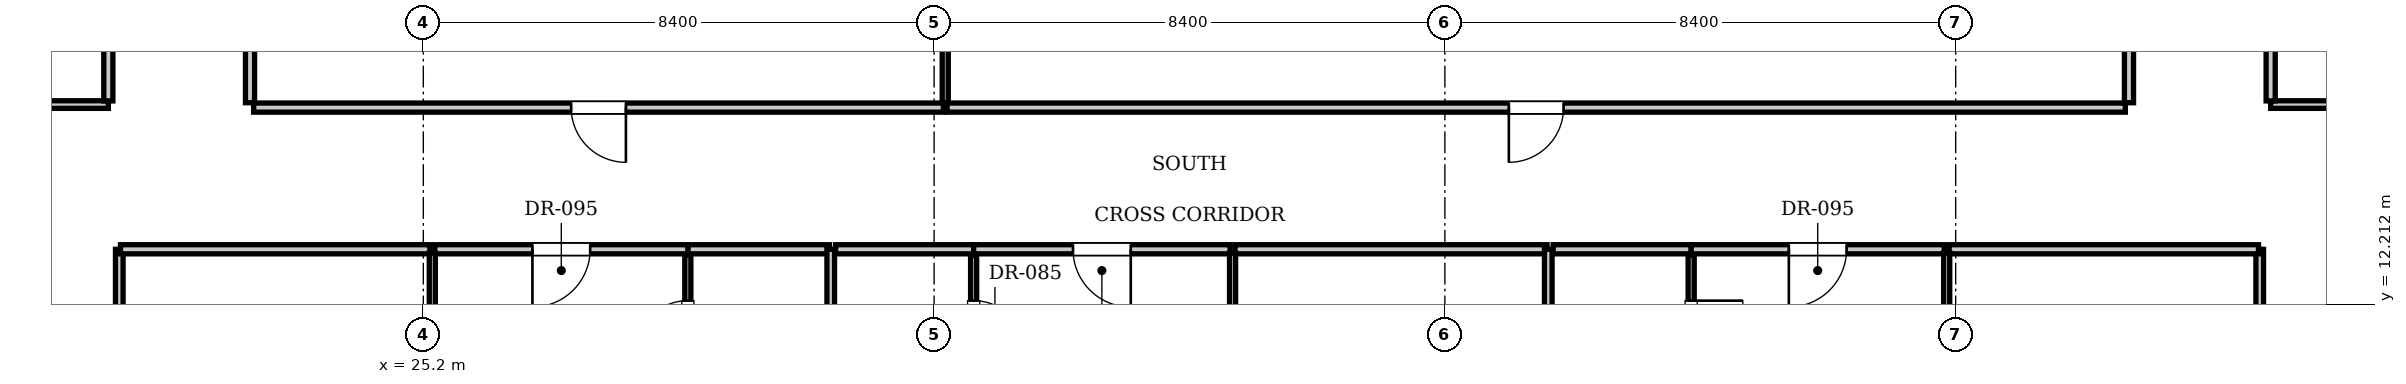
"""IFC4 building model, lengths in metres.
Left out: names, types, materials, properties, quantities, classifications, styles, units other than length and angle.
Written with IfcOpenShell. Run it as: python <this file> out.ifc"""

import sys

from ifc_helpers import new_model, si_unit, direction, frame, frame_2d, origin, place, context, subcontext, project, spatial, rectangle, extrude, element, fill, save


model = new_model("IFC4")
c1 = context("Model", 3, precision=1e-05, world=origin(), true_north=direction((0.0, 1.0)))
c2 = subcontext(c1, "Body", "Model", "MODEL_VIEW")
j1 = project(units=[si_unit("LENGTHUNIT", "METRE"), si_unit("PLANEANGLEUNIT", "RADIAN")], contexts=[c1])
p1 = place(None, origin())
s1 = spatial("IfcSite", under=j1, at=p1, CompositionType="ELEMENT")
p2 = place(p1, origin())
s2 = spatial("IfcBuilding", under=s1, at=p2, CompositionType="ELEMENT")
p3 = place(p2, frame((0.0, 0.0, 69.3)))
s3 = spatial("IfcBuildingStorey", under=s2, at=p3, CompositionType="ELEMENT", Elevation=69.3)
for number, where, z_axis, x_axis in (
    (1, (22.35, 15.53, 0.0), (0.0, 0.0, 1.0), (0.0, 1.0, 0.0)),
    (2, (53.25, 15.53, 0.0), (0.0, 0.0, 1.0), (0.0, 1.0, 0.0)),
):
    element("IfcWall", number, at=place(p3, frame(where, z_axis=z_axis, x_axis=x_axis)), inside=s3, PredefinedType="PARTITIONING", context=c2, shape_type="SweptSolid", body=[
        extrude(rectangle(XDim=8.34, YDim=0.15, at=frame_2d((4.17, 0.0))), origin(), (0.0, 0.0, 1.0), 3.61),
    ])
p4 = place(p3, frame((22.41, 15.45, 0.0), z_axis=(0.0, 0.0, 1.0), x_axis=(1.0, 0.0, 0.0)))
e3 = element("IfcWall", 3, at=p4, inside=s3, PredefinedType="PARTITIONING", context=c2, shape_type="SweptSolid", body=[
    extrude(rectangle(XDim=11.343, YDim=0.15, at=frame_2d((5.671, 0.0))), origin(), (0.0, 0.0, 1.0), 3.61),
])
p5 = place(p4, frame((5.221, 0.0, 0.0)))
e4 = element("IfcOpeningElement", 4, at=p5, cuts=e3, PredefinedType="OPENING", context=c2, shape_type="SweptSolid", body=[
    extrude(rectangle(XDim=0.9, YDim=2.1, at=frame_2d((0.45, 1.05))), frame((0.0, 0.085, 0.0), z_axis=(0.0, -1.0, 0.0), x_axis=(1.0, 0.0, 0.0)), (0.0, 0.0, 1.0), 0.17),
])
p6 = place(p3, frame((33.783, 15.53, 0.0), z_axis=(0.0, 0.0, 1.0), x_axis=(0.0, 1.0, 0.0)))
e5 = element("IfcWall", 5, at=p6, inside=s3, PredefinedType="PARTITIONING", context=c2, shape_type="SweptSolid", body=[
    extrude(rectangle(XDim=8.34, YDim=0.1, at=frame_2d((4.17, 0.0))), origin(), (0.0, 0.0, 1.0), 2.988),
])
p7 = place(p3, frame((33.813, 15.45, 0.0), z_axis=(0.0, 0.0, 1.0), x_axis=(1.0, 0.0, 0.0)))
e6 = element("IfcWall", 6, at=p7, inside=s3, PredefinedType="PARTITIONING", context=c2, shape_type="SweptSolid", body=[
    extrude(rectangle(XDim=19.377, YDim=0.15, at=frame_2d((9.688, 0.0))), origin(), (0.0, 0.0, 1.0), 3.61),
])
p8 = place(p7, frame((9.239, 0.0, 0.0)))
e7 = element("IfcOpeningElement", 7, at=p8, cuts=e6, PredefinedType="OPENING", context=c2, shape_type="SweptSolid", body=[
    extrude(rectangle(XDim=0.9, YDim=2.1, at=frame_2d((0.45, 1.05))), frame((0.0, 0.085, 0.0), z_axis=(0.0, -1.0, 0.0), x_axis=(1.0, 0.0, 0.0)), (0.0, 0.0, 1.0), 0.17),
])
for number, where, z_axis, x_axis in (
    (8, (20.2, 0.1, 0.0), (0.0, 0.0, 1.0), (0.0, 1.0, 0.0)),
    (9, (55.4, 0.1, 0.0), (0.0, 0.0, 1.0), (0.0, 1.0, 0.0)),
):
    element("IfcWall", number, at=place(p3, frame(where, z_axis=z_axis, x_axis=x_axis)), inside=s3, PredefinedType="PARTITIONING", context=c2, shape_type="SweptSolid", body=[
        extrude(rectangle(XDim=13.02, YDim=0.125, at=frame_2d((6.51, 0.0))), origin(), (0.0, 0.0, 1.0), 3.61),
    ])
p9 = place(p3, frame((29.55, 13.12, 0.0), z_axis=(0.0, 0.0, 1.0), x_axis=(1.0, 0.0, 0.0)))
e10 = element("IfcWall", 10, at=p9, inside=s3, PredefinedType="PARTITIONING", context=c2, shape_type="SweptSolid", body=[
    extrude(rectangle(XDim=2.33, YDim=0.15, at=frame_2d((1.165, 0.0))), origin(), (0.0, 0.0, 1.0), 3.61),
])
p10 = place(p3, frame((29.55, 10.68, 0.0), z_axis=(0.0, 0.0, 1.0), x_axis=(0.0, 1.0, 0.0)))
e11 = element("IfcWall", 11, at=p10, inside=s3, PredefinedType="PARTITIONING", context=c2, shape_type="SweptSolid", body=[
    extrude(rectangle(XDim=2.34, YDim=0.1, at=frame_2d((1.17, 0.0))), origin(), (0.0, 0.0, 1.0), 3.61),
])
p11 = place(p10, frame((0.745, 0.0, 0.0)))
e12 = element("IfcOpeningElement", 12, at=p11, cuts=e11, PredefinedType="OPENING", context=c2, shape_type="SweptSolid", body=[
    extrude(rectangle(XDim=0.85, YDim=2.1, at=frame_2d((0.425, 1.05))), frame((0.0, 0.06, 0.0), z_axis=(0.0, -1.0, 0.0), x_axis=(1.0, 0.0, 0.0)), (0.0, 0.0, 1.0), 0.12),
])
p12 = place(p3, frame((20.22, 13.12, 0.0), z_axis=(0.0, 0.0, 1.0), x_axis=(1.0, 0.0, 0.0)))
e13 = element("IfcWall", 13, at=p12, inside=s3, PredefinedType="PARTITIONING", context=c2, shape_type="SweptSolid", body=[
    extrude(rectangle(XDim=5.088, YDim=0.15, at=frame_2d((2.544, 0.0))), origin(), (0.0, 0.0, 1.0), 3.61),
])
p13 = place(p3, frame((25.388, 13.12, 0.0), z_axis=(0.0, 0.0, 1.0), x_axis=(1.0, 0.0, 0.0)))
e14 = element("IfcWall", 14, at=p13, inside=s3, PredefinedType="PARTITIONING", context=c2, shape_type="SweptSolid", body=[
    extrude(rectangle(XDim=4.162, YDim=0.15, at=frame_2d((2.081, 0.0))), origin(), (0.0, 0.0, 1.0), 3.61),
])
p14 = place(p13, frame((1.606, 0.0, 0.0)))
e15 = element("IfcOpeningElement", 15, at=p14, cuts=e14, PredefinedType="OPENING", context=c2, shape_type="SweptSolid", body=[
    extrude(rectangle(XDim=0.95, YDim=2.15, at=frame_2d((0.475, 1.075))), frame((0.0, 0.085, 0.0), z_axis=(0.0, -1.0, 0.0), x_axis=(1.0, 0.0, 0.0)), (0.0, 0.0, 1.0), 0.17),
])
p15 = place(p3, frame((25.348, 0.03, 0.0), z_axis=(0.0, 0.0, 1.0), x_axis=(0.0, 1.0, 0.0)))
e16 = element("IfcWall", 16, at=p15, inside=s3, PredefinedType="PARTITIONING", context=c2, shape_type="SweptSolid", body=[
    extrude(rectangle(XDim=13.03, YDim=0.1, at=frame_2d((6.515, 0.0))), origin(), (0.0, 0.0, 1.0), 2.988),
])
p16 = place(p15, frame((1.6, 0.0, 0.0)))
e17 = element("IfcOpeningElement", 17, at=p16, cuts=e16, PredefinedType="OPENING", context=c2, shape_type="SweptSolid", body=[
    extrude(rectangle(XDim=0.9, YDim=2.1, at=frame_2d((0.45, 1.05))), frame((0.0, 0.06, 0.0), z_axis=(0.0, -1.0, 0.0), x_axis=(1.0, 0.0, 0.0)), (0.0, 0.0, 1.0), 0.12),
])
p17 = place(p3, frame((31.9, 0.1, 0.0), z_axis=(0.0, 0.0, 1.0), x_axis=(0.0, 1.0, 0.0)))
e18 = element("IfcWall", 18, at=p17, inside=s3, PredefinedType="PARTITIONING", context=c2, shape_type="SweptSolid", body=[
    extrude(rectangle(XDim=13.02, YDim=0.125, at=frame_2d((6.51, 0.0))), origin(), (0.0, 0.0, 1.0), 3.61),
])
p18 = place(p3, frame((31.98, 13.12, 0.0), z_axis=(0.0, 0.0, 1.0), x_axis=(1.0, 0.0, 0.0)))
e19 = element("IfcWall", 19, at=p18, inside=s3, PredefinedType="PARTITIONING", context=c2, shape_type="SweptSolid", body=[
    extrude(rectangle(XDim=2.27, YDim=0.15, at=frame_2d((1.135, 0.0))), origin(), (0.0, 0.0, 1.0), 3.61),
])
p19 = place(p3, frame((34.25, 10.68, 0.0), z_axis=(0.0, 0.0, 1.0), x_axis=(0.0, 1.0, 0.0)))
e20 = element("IfcWall", 20, at=p19, inside=s3, PredefinedType="PARTITIONING", context=c2, shape_type="SweptSolid", body=[
    extrude(rectangle(XDim=2.34, YDim=0.1, at=frame_2d((1.17, 0.0))), origin(), (0.0, 0.0, 1.0), 3.61),
])
p20 = place(p19, frame((0.745, 0.0, 0.0)))
e21 = element("IfcOpeningElement", 21, at=p20, cuts=e20, PredefinedType="OPENING", context=c2, shape_type="SweptSolid", body=[
    extrude(rectangle(XDim=0.85, YDim=2.1, at=frame_2d((0.425, 1.05))), frame((0.0, 0.06, 0.0), z_axis=(0.0, -1.0, 0.0), x_axis=(1.0, 0.0, 0.0)), (0.0, 0.0, 1.0), 0.12),
])
p21 = place(p3, frame((34.25, 13.12, 0.0), z_axis=(0.0, 0.0, 1.0), x_axis=(1.0, 0.0, 0.0)))
e22 = element("IfcWall", 22, at=p21, inside=s3, PredefinedType="PARTITIONING", context=c2, shape_type="SweptSolid", body=[
    extrude(rectangle(XDim=4.218, YDim=0.15, at=frame_2d((2.109, 0.0))), origin(), (0.0, 0.0, 1.0), 3.61),
])
p22 = place(p21, frame((1.634, 0.0, 0.0)))
e23 = element("IfcOpeningElement", 23, at=p22, cuts=e22, PredefinedType="OPENING", context=c2, shape_type="SweptSolid", body=[
    extrude(rectangle(XDim=0.95, YDim=2.15, at=frame_2d((0.475, 1.075))), frame((0.0, 0.085, 0.0), z_axis=(0.0, -1.0, 0.0), x_axis=(1.0, 0.0, 0.0)), (0.0, 0.0, 1.0), 0.17),
])
p23 = place(p3, frame((38.548, 13.12, 0.0), z_axis=(0.0, 0.0, 1.0), x_axis=(1.0, 0.0, 0.0)))
e24 = element("IfcWall", 24, at=p23, inside=s3, PredefinedType="PARTITIONING", context=c2, shape_type="SweptSolid", body=[
    extrude(rectangle(XDim=5.132, YDim=0.15, at=frame_2d((2.566, 0.0))), origin(), (0.0, 0.0, 1.0), 3.61),
])
p24 = place(p3, frame((38.508, 0.03, 0.0), z_axis=(0.0, 0.0, 1.0), x_axis=(0.0, 1.0, 0.0)))
e25 = element("IfcWall", 25, at=p24, inside=s3, PredefinedType="PARTITIONING", context=c2, shape_type="SweptSolid", body=[
    extrude(rectangle(XDim=13.03, YDim=0.1, at=frame_2d((6.515, 0.0))), origin(), (0.0, 0.0, 1.0), 3.61),
])
p25 = place(p24, frame((1.6, 0.0, 0.0)))
e26 = element("IfcOpeningElement", 26, at=p25, cuts=e25, PredefinedType="OPENING", context=c2, shape_type="SweptSolid", body=[
    extrude(rectangle(XDim=0.9, YDim=2.1, at=frame_2d((0.45, 1.05))), frame((0.0, 0.06, 0.0), z_axis=(0.0, -1.0, 0.0), x_axis=(1.0, 0.0, 0.0)), (0.0, 0.0, 1.0), 0.12),
])
p26 = place(p3, frame((43.7, 0.1, 0.0), z_axis=(0.0, 0.0, 1.0), x_axis=(0.0, 1.0, 0.0)))
e27 = element("IfcWall", 27, at=p26, inside=s3, PredefinedType="PARTITIONING", context=c2, shape_type="SweptSolid", body=[
    extrude(rectangle(XDim=13.02, YDim=0.125, at=frame_2d((6.51, 0.0))), origin(), (0.0, 0.0, 1.0), 3.61),
])
p27 = place(p3, frame((43.78, 13.12, 0.0), z_axis=(0.0, 0.0, 1.0), x_axis=(1.0, 0.0, 0.0)))
e28 = element("IfcWall", 28, at=p27, inside=s3, PredefinedType="PARTITIONING", context=c2, shape_type="SweptSolid", body=[
    extrude(rectangle(XDim=2.27, YDim=0.15, at=frame_2d((1.135, 0.0))), origin(), (0.0, 0.0, 1.0), 3.61),
])
p28 = place(p3, frame((46.05, 10.68, 0.0), z_axis=(0.0, 0.0, 1.0), x_axis=(0.0, 1.0, 0.0)))
e29 = element("IfcWall", 29, at=p28, inside=s3, PredefinedType="PARTITIONING", context=c2, shape_type="SweptSolid", body=[
    extrude(rectangle(XDim=2.34, YDim=0.1, at=frame_2d((1.17, 0.0))), origin(), (0.0, 0.0, 1.0), 3.61),
])
p29 = place(p28, frame((0.745, 0.0, 0.0)))
e30 = element("IfcOpeningElement", 30, at=p29, cuts=e29, PredefinedType="OPENING", context=c2, shape_type="SweptSolid", body=[
    extrude(rectangle(XDim=0.85, YDim=2.1, at=frame_2d((0.425, 1.05))), frame((0.0, 0.06, 0.0), z_axis=(0.0, -1.0, 0.0), x_axis=(1.0, 0.0, 0.0)), (0.0, 0.0, 1.0), 0.12),
])
p30 = place(p3, frame((46.05, 13.12, 0.0), z_axis=(0.0, 0.0, 1.0), x_axis=(1.0, 0.0, 0.0)))
e31 = element("IfcWall", 31, at=p30, inside=s3, PredefinedType="PARTITIONING", context=c2, shape_type="SweptSolid", body=[
    extrude(rectangle(XDim=4.162, YDim=0.15, at=frame_2d((2.081, 0.0))), origin(), (0.0, 0.0, 1.0), 3.61),
])
p31 = place(p30, frame((1.606, 0.0, 0.0)))
e32 = element("IfcOpeningElement", 32, at=p31, cuts=e31, PredefinedType="OPENING", context=c2, shape_type="SweptSolid", body=[
    extrude(rectangle(XDim=0.95, YDim=2.15, at=frame_2d((0.475, 1.075))), frame((0.0, 0.085, 0.0), z_axis=(0.0, -1.0, 0.0), x_axis=(1.0, 0.0, 0.0)), (0.0, 0.0, 1.0), 0.17),
])
p32 = place(p3, frame((50.292, 13.12, 0.0), z_axis=(0.0, 0.0, 1.0), x_axis=(1.0, 0.0, 0.0)))
e33 = element("IfcWall", 33, at=p32, inside=s3, PredefinedType="PARTITIONING", context=c2, shape_type="SweptSolid", body=[
    extrude(rectangle(XDim=5.088, YDim=0.15, at=frame_2d((2.544, 0.0))), origin(), (0.0, 0.0, 1.0), 3.61),
])
p33 = place(p3, frame((50.252, 0.03, 0.0), z_axis=(0.0, 0.0, 1.0), x_axis=(0.0, 1.0, 0.0)))
e34 = element("IfcWall", 34, at=p33, inside=s3, PredefinedType="PARTITIONING", context=c2, shape_type="SweptSolid", body=[
    extrude(rectangle(XDim=13.03, YDim=0.1, at=frame_2d((6.515, 0.0))), origin(), (0.0, 0.0, 1.0), 2.988),
])
p34 = place(p33, frame((1.6, 0.0, 0.0)))
e35 = element("IfcOpeningElement", 35, at=p34, cuts=e34, PredefinedType="OPENING", context=c2, shape_type="SweptSolid", body=[
    extrude(rectangle(XDim=0.9, YDim=2.1, at=frame_2d((0.45, 1.05))), frame((0.0, 0.06, 0.0), z_axis=(0.0, -1.0, 0.0), x_axis=(1.0, 0.0, 0.0)), (0.0, 0.0, 1.0), 0.12),
])
p35 = place(p3, frame((10.9, 15.5, 0.0), z_axis=(0.0, 0.0, 1.0), x_axis=(1.0, 0.0, 0.0)))
e36 = element("IfcWall", 36, at=p35, inside=s3, PredefinedType="PARTITIONING", context=c2, shape_type="SweptSolid", body=[
    extrude(rectangle(XDim=9.12, YDim=0.125, at=frame_2d((4.56, 0.0))), origin(), (0.0, 0.0, 1.0), 3.61),
])
p36 = place(p3, frame((55.58, 15.5, 0.0), z_axis=(0.0, 0.0, 1.0), x_axis=(1.0, 0.0, 0.0)))
e37 = element("IfcWall", 37, at=p36, inside=s3, PredefinedType="PARTITIONING", context=c2, shape_type="SweptSolid", body=[
    extrude(rectangle(XDim=9.12, YDim=0.125, at=frame_2d((4.56, 0.0))), origin(), (0.0, 0.0, 1.0), 3.61),
])
p37 = place(p3, frame((20.02, 15.56, 0.0), z_axis=(0.0, 0.0, 1.0), x_axis=(0.0, 1.0, 0.0)))
e38 = element("IfcWall", 38, at=p37, inside=s3, PredefinedType="PARTITIONING", context=c2, shape_type="SweptSolid", body=[
    extrude(rectangle(XDim=6.14, YDim=0.15, at=frame_2d((3.07, 0.0))), origin(), (0.0, 0.0, 1.0), 3.61),
])
p38 = place(p37, frame((2.595, 0.0, 0.0)))
e39 = element("IfcOpeningElement", 39, at=p38, cuts=e38, PredefinedType="OPENING", context=c2, shape_type="SweptSolid", body=[
    extrude(rectangle(XDim=0.95, YDim=2.15, at=frame_2d((0.475, 1.075))), frame((0.0, 0.085, 0.0), z_axis=(0.0, -1.0, 0.0), x_axis=(1.0, 0.0, 0.0)), (0.0, 0.0, 1.0), 0.17),
])
p39 = place(p3, frame((55.58, 15.56, 0.0), z_axis=(0.0, 0.0, 1.0), x_axis=(0.0, 1.0, 0.0)))
e40 = element("IfcWall", 40, at=p39, inside=s3, PredefinedType="PARTITIONING", context=c2, shape_type="SweptSolid", body=[
    extrude(rectangle(XDim=6.14, YDim=0.15, at=frame_2d((3.07, 0.0))), origin(), (0.0, 0.0, 1.0), 3.61),
])
p40 = place(p39, frame((2.595, 0.0, 0.0)))
e41 = element("IfcOpeningElement", 41, at=p40, cuts=e40, PredefinedType="OPENING", context=c2, shape_type="SweptSolid", body=[
    extrude(rectangle(XDim=0.95, YDim=2.15, at=frame_2d((0.475, 1.075))), frame((0.0, 0.085, 0.0), z_axis=(0.0, -1.0, 0.0), x_axis=(1.0, 0.0, 0.0)), (0.0, 0.0, 1.0), 0.17),
])
p41 = place(p5, frame((0.9, 0.0, 0.0), z_axis=(0.0, 0.0, 1.0), x_axis=(-1.0, 0.0, 0.0)))
e42 = element("IfcDoor", 42, at=p41, inside=s3, OperationType="SINGLE_SWING_LEFT", PredefinedType="DOOR", context=c2, shape_type="SweptSolid", body=[
    extrude(rectangle(XDim=0.9, YDim=2.1, at=frame_2d((0.45, 1.05))), frame((0.0, 0.025, 0.0), z_axis=(0.0, -1.0, 0.0), x_axis=(1.0, 0.0, 0.0)), (0.0, 0.0, 1.0), 0.05),
])
fill(e4, e42)
p42 = place(p8, frame((0.9, 0.0, 0.0), z_axis=(0.0, 0.0, 1.0), x_axis=(-1.0, 0.0, 0.0)))
e43 = element("IfcDoor", 43, at=p42, inside=s3, OperationType="SINGLE_SWING_RIGHT", PredefinedType="DOOR", context=c2, shape_type="SweptSolid", body=[
    extrude(rectangle(XDim=0.9, YDim=2.1, at=frame_2d((0.45, 1.05))), frame((0.0, 0.025, 0.0), z_axis=(0.0, -1.0, 0.0), x_axis=(1.0, 0.0, 0.0)), (0.0, 0.0, 1.0), 0.05),
])
fill(e7, e43)
p43 = place(p11, origin())
e44 = element("IfcDoor", 44, at=p43, inside=s3, OperationType="SINGLE_SWING_LEFT", PredefinedType="DOOR", context=c2, shape_type="SweptSolid", body=[
    extrude(rectangle(XDim=0.85, YDim=2.1, at=frame_2d((0.425, 1.05))), frame((0.0, 0.025, 0.0), z_axis=(0.0, -1.0, 0.0), x_axis=(1.0, 0.0, 0.0)), (0.0, 0.0, 1.0), 0.05),
])
fill(e12, e44)
p44 = place(p14, frame((0.95, 0.0, 0.0), z_axis=(0.0, 0.0, 1.0), x_axis=(-1.0, 0.0, 0.0)))
e45 = element("IfcDoor", 45, at=p44, inside=s3, OperationType="SINGLE_SWING_RIGHT", PredefinedType="DOOR", context=c2, shape_type="SweptSolid", body=[
    extrude(rectangle(XDim=0.95, YDim=2.15, at=frame_2d((0.475, 1.075))), frame((0.0, 0.025, 0.0), z_axis=(0.0, -1.0, 0.0), x_axis=(1.0, 0.0, 0.0)), (0.0, 0.0, 1.0), 0.05),
])
fill(e15, e45)
p45 = place(p20, frame((0.85, 0.0, 0.0), z_axis=(0.0, 0.0, 1.0), x_axis=(-1.0, 0.0, 0.0)))
e46 = element("IfcDoor", 46, at=p45, inside=s3, OperationType="SINGLE_SWING_RIGHT", PredefinedType="DOOR", context=c2, shape_type="SweptSolid", body=[
    extrude(rectangle(XDim=0.85, YDim=2.1, at=frame_2d((0.425, 1.05))), frame((0.0, 0.025, 0.0), z_axis=(0.0, -1.0, 0.0), x_axis=(1.0, 0.0, 0.0)), (0.0, 0.0, 1.0), 0.05),
])
fill(e21, e46)
p46 = place(p22, frame((0.95, 0.0, 0.0), z_axis=(0.0, 0.0, 1.0), x_axis=(-1.0, 0.0, 0.0)))
e47 = element("IfcDoor", 47, at=p46, inside=s3, OperationType="SINGLE_SWING_LEFT", PredefinedType="DOOR", context=c2, shape_type="SweptSolid", body=[
    extrude(rectangle(XDim=0.95, YDim=2.15, at=frame_2d((0.475, 1.075))), frame((0.0, 0.025, 0.0), z_axis=(0.0, -1.0, 0.0), x_axis=(1.0, 0.0, 0.0)), (0.0, 0.0, 1.0), 0.05),
])
fill(e23, e47)
p47 = place(p29, frame((0.85, 0.0, 0.0), z_axis=(0.0, 0.0, 1.0), x_axis=(-1.0, 0.0, 0.0)))
e48 = element("IfcDoor", 48, at=p47, inside=s3, OperationType="SINGLE_SWING_LEFT", PredefinedType="DOOR", context=c2, shape_type="SweptSolid", body=[
    extrude(rectangle(XDim=0.85, YDim=2.1, at=frame_2d((0.425, 1.05))), frame((0.0, 0.025, 0.0), z_axis=(0.0, -1.0, 0.0), x_axis=(1.0, 0.0, 0.0)), (0.0, 0.0, 1.0), 0.05),
])
fill(e30, e48)
p48 = place(p31, frame((0.95, 0.0, 0.0), z_axis=(0.0, 0.0, 1.0), x_axis=(-1.0, 0.0, 0.0)))
e49 = element("IfcDoor", 49, at=p48, inside=s3, OperationType="SINGLE_SWING_RIGHT", PredefinedType="DOOR", context=c2, shape_type="SweptSolid", body=[
    extrude(rectangle(XDim=0.95, YDim=2.15, at=frame_2d((0.475, 1.075))), frame((0.0, 0.025, 0.0), z_axis=(0.0, -1.0, 0.0), x_axis=(1.0, 0.0, 0.0)), (0.0, 0.0, 1.0), 0.05),
])
fill(e32, e49)
save(model, sys.argv[1])
